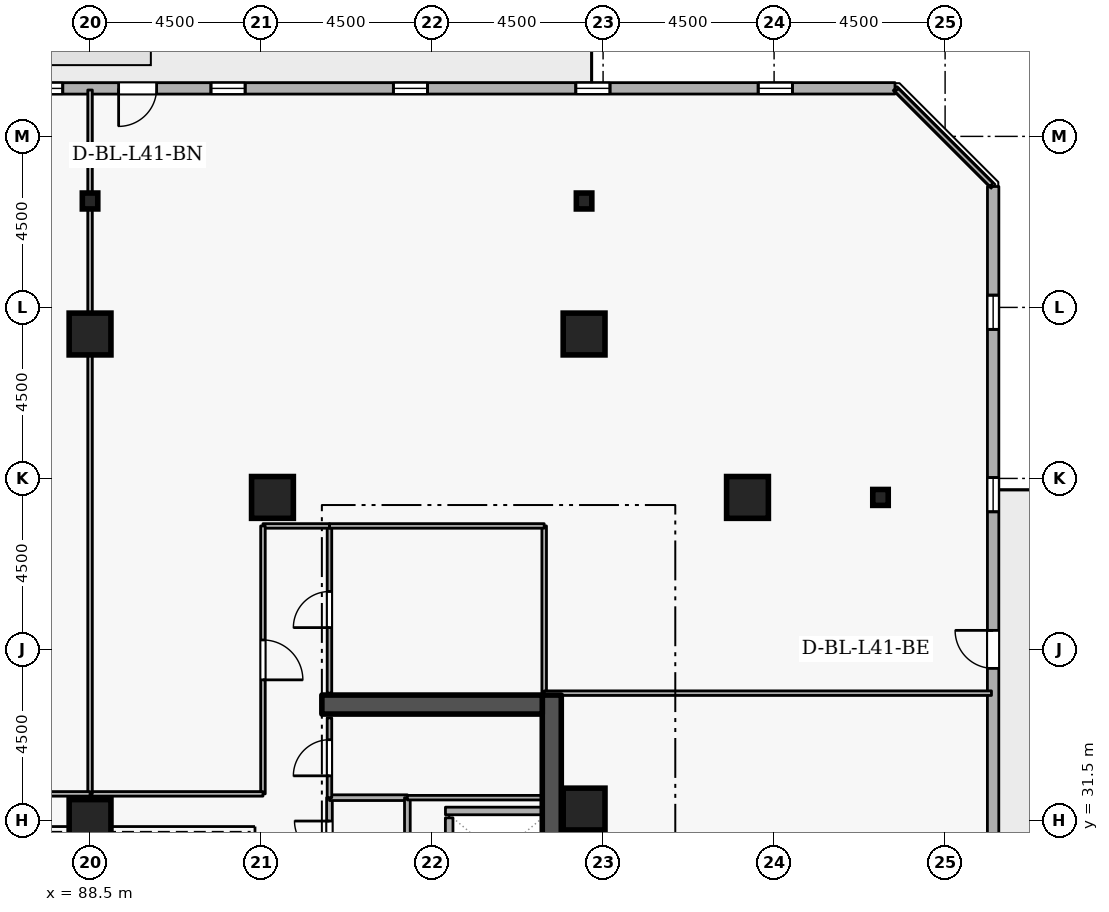
"""IFC4 building model, lengths in metres.
Left out: names, types, materials, properties, quantities, classifications, styles, units other than length and angle.
Written with IfcOpenShell. Run it as: python <this file> out.ifc"""

import sys

from ifc_helpers import new_model, si_unit, direction, frame, frame_2d, origin, origin_2d, place, context, subcontext, project, spatial, rectangle, i_section, extrude, element, fill, save


model = new_model("IFC4")
c1 = context("Model", 3, precision=1e-05, world=origin(), true_north=direction((0.0, 1.0)))
c2 = subcontext(c1, "Body", "Model", "MODEL_VIEW")
j1 = project(units=[si_unit("LENGTHUNIT", "METRE"), si_unit("PLANEANGLEUNIT", "RADIAN")], contexts=[c1])
p1 = place(None, origin())
s1 = spatial("IfcSite", under=j1, at=p1, CompositionType="ELEMENT")
p2 = place(p1, origin())
s2 = spatial("IfcBuilding", under=s1, at=p2, CompositionType="ELEMENT")
p3 = place(p2, frame((0.0, 0.0, 156.3)))
s3 = spatial("IfcBuildingStorey", under=s2, at=p3, CompositionType="ELEMENT", Elevation=156.3)
p4 = place(p3, frame((100.65, 19.2, 0.0), z_axis=(0.0, 0.0, 1.0), x_axis=(0.0, 1.0, 0.0)))
e1 = element("IfcWall", 1, at=p4, inside=s3, PredefinedType="SHEAR", context=c2, shape_type="SweptSolid", body=[
    extrude(rectangle(XDim=15.6, YDim=0.5, at=frame_2d((7.8, 0.0))), origin(), (0.0, 0.0, 1.0), 3.6),
])
p5 = place(p3, frame((94.6, 34.55, 0.0), z_axis=(0.0, 0.0, 1.0), x_axis=(1.0, 0.0, 0.0)))
e2 = element("IfcWall", 2, at=p5, inside=s3, PredefinedType="SHEAR", context=c2, shape_type="SweptSolid", body=[
    extrude(rectangle(XDim=5.8, YDim=0.5, at=frame_2d((2.9, 0.0))), origin(), (0.0, 0.0, 1.0), 3.6),
])
for number, where, z_axis, x_axis in (
    (3, (105.8, 40.0, 0.0), (0.0, 0.0, 1.0), (1.0, 0.0, 0.0)),
    (4, (101.5, 44.3, 0.0), (0.0, 0.0, 1.0), (1.0, 0.0, 0.0)),
    (5, (88.5, 44.3, 0.0), (0.0, 0.0, 1.0), (1.0, 0.0, 0.0)),
    (6, (93.3, 40.0, 0.0), (0.0, 0.0, 1.0), (1.0, 0.0, 0.0)),
    (7, (101.5, 31.8, 0.0), (0.0, 0.0, 1.0), (1.0, 0.0, 0.0)),
    (8, (88.5, 31.5, 0.0), (0.0, 0.0, 1.0), (1.0, 0.0, 0.0)),
):
    element("IfcColumn", number, at=place(p3, frame(where, z_axis=z_axis, x_axis=x_axis)), inside=s3, PredefinedType="COLUMN", context=c2, shape_type="SweptSolid", body=[
        extrude(rectangle(XDim=1.1, YDim=1.1, at=origin_2d()), origin(), (0.0, 0.0, 1.0), 3.6),
    ])
for number, where, z_axis, x_axis in (
    (9, (109.3, 40.0, 0.0), (0.0, 0.0, 1.0), (1.0, 0.0, 0.0)),
    (10, (101.5, 47.8, 0.0), (0.0, 0.0, 1.0), (1.0, 0.0, 0.0)),
    (11, (88.5, 47.8, 0.0), (0.0, 0.0, 1.0), (1.0, 0.0, 0.0)),
):
    element("IfcColumn", number, at=place(p3, frame(where, z_axis=z_axis, x_axis=x_axis)), inside=s3, PredefinedType="COLUMN", context=c2, shape_type="SweptSolid", body=[
        extrude(i_section(OverallWidth=0.407, OverallDepth=0.419, WebThickness=0.031, FlangeThickness=0.049, FilletRadius=0.015, at=origin_2d()), origin(), (0.0, 0.0, 1.0), 3.6),
    ])
p6 = place(p3, frame((112.261, 12.922, 0.0), z_axis=(0.0, 0.0, 1.0), x_axis=(0.000103863011, 0.999999994606, 0.0)))
e12 = element("IfcWall", 12, at=p6, inside=s3, PredefinedType="STANDARD", context=c2, shape_type="SweptSolid", body=[
    extrude(rectangle(XDim=35.259, YDim=0.3, at=frame_2d((17.629, 0.0))), origin(), (0.0, 0.0, 1.0), 2.7),
])
p7 = place(p6, frame((22.58, 0.0, 0.0)))
e13 = element("IfcOpeningElement", 13, at=p7, cuts=e12, PredefinedType="OPENING", context=c2, shape_type="SweptSolid", body=[
    extrude(rectangle(XDim=1.0, YDim=2.08, at=frame_2d((0.5, 1.04))), frame((0.0, 0.16, 0.0), z_axis=(0.0, -1.0, 0.0), x_axis=(1.0, 0.0, 0.0)), (0.0, 0.0, 1.0), 0.32),
])
p8 = place(p6, frame((7.5, 0.0, 0.72)))
e14 = element("IfcOpeningElement", 14, at=p8, cuts=e12, PredefinedType="OPENING", context=c2, shape_type="SweptSolid", body=[
    extrude(rectangle(XDim=0.9, YDim=1.75, at=frame_2d((0.45, 0.875))), frame((0.0, 0.16, 0.0), z_axis=(0.0, -1.0, 0.0), x_axis=(1.0, 0.0, 0.0)), (0.0, 0.0, 1.0), 0.32),
])
p9 = place(p6, frame((12.3, 0.0, 0.72)))
e15 = element("IfcOpeningElement", 15, at=p9, cuts=e12, PredefinedType="OPENING", context=c2, shape_type="SweptSolid", body=[
    extrude(rectangle(XDim=0.9, YDim=1.75, at=frame_2d((0.45, 0.875))), frame((0.0, 0.16, 0.0), z_axis=(0.0, -1.0, 0.0), x_axis=(1.0, 0.0, 0.0)), (0.0, 0.0, 1.0), 0.32),
])
p10 = place(p6, frame((17.1, 0.0, 0.72)))
e16 = element("IfcOpeningElement", 16, at=p10, cuts=e12, PredefinedType="OPENING", context=c2, shape_type="SweptSolid", body=[
    extrude(rectangle(XDim=0.9, YDim=1.75, at=frame_2d((0.45, 0.875))), frame((0.0, 0.16, 0.0), z_axis=(0.0, -1.0, 0.0), x_axis=(1.0, 0.0, 0.0)), (0.0, 0.0, 1.0), 0.32),
])
p11 = place(p6, frame((26.7, 0.0, 0.72)))
e17 = element("IfcOpeningElement", 17, at=p11, cuts=e12, PredefinedType="OPENING", context=c2, shape_type="SweptSolid", body=[
    extrude(rectangle(XDim=0.9, YDim=1.75, at=frame_2d((0.45, 0.875))), frame((0.0, 0.16, 0.0), z_axis=(0.0, -1.0, 0.0), x_axis=(1.0, 0.0, 0.0)), (0.0, 0.0, 1.0), 0.32),
])
p12 = place(p6, frame((31.5, 0.0, 0.72)))
e18 = element("IfcOpeningElement", 18, at=p12, cuts=e12, PredefinedType="OPENING", context=c2, shape_type="SweptSolid", body=[
    extrude(rectangle(XDim=0.9, YDim=1.75, at=frame_2d((0.45, 0.875))), frame((0.0, 0.16, 0.0), z_axis=(0.0, -1.0, 0.0), x_axis=(1.0, 0.0, 0.0)), (0.0, 0.0, 1.0), 0.32),
])
p13 = place(p3, frame((109.681, 50.765, 0.0), z_axis=(0.0, 0.0, 1.0), x_axis=(-0.999999994606, -0.000103863011, 0.0)))
e19 = element("IfcWall", 19, at=p13, inside=s3, PredefinedType="STANDARD", context=c2, shape_type="SweptSolid", body=[
    extrude(rectangle(XDim=35.259, YDim=0.3, at=frame_2d((17.629, 0.0))), origin(), (0.0, 0.0, 1.0), 2.7),
])
p14 = place(p13, frame((19.43, 0.0, 0.0)))
e20 = element("IfcOpeningElement", 20, at=p14, cuts=e19, PredefinedType="OPENING", context=c2, shape_type="SweptSolid", body=[
    extrude(rectangle(XDim=1.0, YDim=2.08, at=frame_2d((0.5, 1.04))), frame((0.0, 0.16, 0.0), z_axis=(0.0, -1.0, 0.0), x_axis=(1.0, 0.0, 0.0)), (0.0, 0.0, 1.0), 0.32),
])
p15 = place(p13, frame((2.7, 0.0, 0.72)))
e21 = element("IfcOpeningElement", 21, at=p15, cuts=e19, PredefinedType="OPENING", context=c2, shape_type="SweptSolid", body=[
    extrude(rectangle(XDim=0.9, YDim=1.75, at=frame_2d((0.45, 0.875))), frame((0.0, 0.16, 0.0), z_axis=(0.0, -1.0, 0.0), x_axis=(1.0, 0.0, 0.0)), (0.0, 0.0, 1.0), 0.32),
])
p16 = place(p13, frame((7.5, 0.0, 0.72)))
e22 = element("IfcOpeningElement", 22, at=p16, cuts=e19, PredefinedType="OPENING", context=c2, shape_type="SweptSolid", body=[
    extrude(rectangle(XDim=0.9, YDim=1.75, at=frame_2d((0.45, 0.875))), frame((0.0, 0.16, 0.0), z_axis=(0.0, -1.0, 0.0), x_axis=(1.0, 0.0, 0.0)), (0.0, 0.0, 1.0), 0.32),
])
p17 = place(p13, frame((12.3, 0.0, 0.72)))
e23 = element("IfcOpeningElement", 23, at=p17, cuts=e19, PredefinedType="OPENING", context=c2, shape_type="SweptSolid", body=[
    extrude(rectangle(XDim=0.9, YDim=1.75, at=frame_2d((0.45, 0.875))), frame((0.0, 0.16, 0.0), z_axis=(0.0, -1.0, 0.0), x_axis=(1.0, 0.0, 0.0)), (0.0, 0.0, 1.0), 0.32),
])
p18 = place(p13, frame((17.1, 0.0, 0.72)))
e24 = element("IfcOpeningElement", 24, at=p18, cuts=e19, PredefinedType="OPENING", context=c2, shape_type="SweptSolid", body=[
    extrude(rectangle(XDim=0.9, YDim=1.75, at=frame_2d((0.45, 0.875))), frame((0.0, 0.16, 0.0), z_axis=(0.0, -1.0, 0.0), x_axis=(1.0, 0.0, 0.0)), (0.0, 0.0, 1.0), 0.32),
])
p19 = place(p13, frame((21.9, 0.0, 0.72)))
e25 = element("IfcOpeningElement", 25, at=p19, cuts=e19, PredefinedType="OPENING", context=c2, shape_type="SweptSolid", body=[
    extrude(rectangle(XDim=0.9, YDim=1.75, at=frame_2d((0.45, 0.875))), frame((0.0, 0.16, 0.0), z_axis=(0.0, -1.0, 0.0), x_axis=(1.0, 0.0, 0.0)), (0.0, 0.0, 1.0), 0.32),
])
p20 = place(p13, frame((26.7, 0.0, 0.72)))
e26 = element("IfcOpeningElement", 26, at=p20, cuts=e19, PredefinedType="OPENING", context=c2, shape_type="SweptSolid", body=[
    extrude(rectangle(XDim=0.9, YDim=1.75, at=frame_2d((0.45, 0.875))), frame((0.0, 0.16, 0.0), z_axis=(0.0, -1.0, 0.0), x_axis=(1.0, 0.0, 0.0)), (0.0, 0.0, 1.0), 0.32),
])
p21 = place(p13, frame((31.5, 0.0, 0.72)))
e27 = element("IfcOpeningElement", 27, at=p21, cuts=e19, PredefinedType="OPENING", context=c2, shape_type="SweptSolid", body=[
    extrude(rectangle(XDim=0.9, YDim=1.75, at=frame_2d((0.45, 0.875))), frame((0.0, 0.16, 0.0), z_axis=(0.0, -1.0, 0.0), x_axis=(1.0, 0.0, 0.0)), (0.0, 0.0, 1.0), 0.32),
])
p22 = place(p3, frame((97.95, 31.57, 0.0), z_axis=(0.0, 0.0, 1.0), x_axis=(0.0, -1.0, 0.0)))
e28 = element("IfcWall", 28, at=p22, inside=s3, PredefinedType="STANDARD", context=c2, shape_type="SweptSolid", body=[
    extrude(rectangle(XDim=1.99, YDim=0.2, at=frame_2d((0.995, 0.0))), origin(), (0.0, 0.0, 1.0), 3.34),
])
p23 = place(p3, frame((97.852, 31.75, 0.0), z_axis=(0.0, 0.0, 1.0), x_axis=(1.0, 0.0, 0.0)))
e29 = element("IfcWall", 29, at=p23, inside=s3, PredefinedType="STANDARD", context=c2, shape_type="SweptSolid", body=[
    extrude(rectangle(XDim=2.536, YDim=0.2, at=frame_2d((1.268, 0.0))), origin(), (0.0, 0.0, 1.0), 3.34),
])
p24 = place(p3, frame((94.8, 29.95, 0.0), z_axis=(0.0, 0.0, 1.0), x_axis=(0.0, 1.0, 0.0)))
e30 = element("IfcWall", 30, at=p24, inside=s3, PredefinedType="PARTITIONING", context=c2, shape_type="SweptSolid", body=[
    extrude(rectangle(XDim=2.15, YDim=0.15, at=frame_2d((1.075, 0.0))), origin(), (0.0, 0.0, 1.0), 3.34),
])
p25 = place(p24, frame((0.615, 0.0, 0.0)))
e31 = element("IfcOpeningElement", 31, at=p25, cuts=e30, PredefinedType="OPENING", context=c2, shape_type="SweptSolid", body=[
    extrude(rectangle(XDim=0.92, YDim=2.08, at=frame_2d((0.46, 1.04))), frame((0.0, 0.085, 0.0), z_axis=(0.0, -1.0, 0.0), x_axis=(1.0, 0.0, 0.0)), (0.0, 0.0, 1.0), 0.17),
])
p26 = place(p3, frame((94.8, 32.1, 0.0), z_axis=(0.0, 0.0, 1.0), x_axis=(1.0, 0.0, 0.0)))
e32 = element("IfcWall", 32, at=p26, inside=s3, PredefinedType="PARTITIONING", context=c2, shape_type="SweptSolid", body=[
    extrude(rectangle(XDim=2.05, YDim=0.15, at=frame_2d((1.025, 0.0))), origin(), (0.0, 0.0, 1.0), 3.34),
])
p27 = place(p3, frame((96.85, 32.1, 0.0), z_axis=(0.0, 0.0, 1.0), x_axis=(0.0, -1.0, 0.0)))
e33 = element("IfcWall", 33, at=p27, inside=s3, PredefinedType="PARTITIONING", context=c2, shape_type="SweptSolid", body=[
    extrude(rectangle(XDim=2.15, YDim=0.15, at=frame_2d((1.075, 0.0))), origin(), (0.0, 0.0, 1.0), 3.34),
])
p28 = place(p3, frame((94.8, 32.1, 0.0), z_axis=(0.0, 0.0, 1.0), x_axis=(0.0, 1.0, 0.0)))
e34 = element("IfcWall", 34, at=p28, inside=s3, PredefinedType="PARTITIONING", context=c2, shape_type="SweptSolid", body=[
    extrude(rectangle(XDim=2.1, YDim=0.12, at=frame_2d((1.05, 0.0))), origin(), (0.0, 0.0, 1.0), 3.34),
])
p29 = place(p28, frame((0.575, 0.0, 0.0)))
e35 = element("IfcOpeningElement", 35, at=p29, cuts=e34, PredefinedType="OPENING", context=c2, shape_type="SweptSolid", body=[
    extrude(rectangle(XDim=0.95, YDim=2.1, at=frame_2d((0.475, 1.05))), frame((0.0, 0.07, 0.0), z_axis=(0.0, -1.0, 0.0), x_axis=(1.0, 0.0, 0.0)), (0.0, 0.0, 1.0), 0.14),
])
p30 = place(p3, frame((100.4, 32.1, 0.0), z_axis=(0.0, 0.0, 1.0), x_axis=(-1.0, 0.0, 0.0)))
e36 = element("IfcWall", 36, at=p30, inside=s3, PredefinedType="PARTITIONING", context=c2, shape_type="SweptSolid", body=[
    extrude(rectangle(XDim=3.55, YDim=0.12, at=frame_2d((1.775, 0.0))), origin(), (0.0, 0.0, 1.0), 3.34),
])
p31 = place(p3, frame((100.45, 39.25, 0.0), z_axis=(0.0, 0.0, 1.0), x_axis=(0.0, -1.0, 0.0)))
e37 = element("IfcWall", 37, at=p31, inside=s3, PredefinedType="PARTITIONING", context=c2, shape_type="SweptSolid", body=[
    extrude(rectangle(XDim=4.4, YDim=0.12, at=frame_2d((2.2, 0.0))), origin(), (0.0, 0.0, 1.0), 3.34),
])
p32 = place(p3, frame((94.8, 34.85, 0.0), z_axis=(0.0, 0.0, 1.0), x_axis=(0.0, 1.0, 0.0)))
e38 = element("IfcWall", 38, at=p32, inside=s3, PredefinedType="PARTITIONING", context=c2, shape_type="SweptSolid", body=[
    extrude(rectangle(XDim=4.4, YDim=0.12, at=frame_2d((2.2, 0.0))), origin(), (0.0, 0.0, 1.0), 3.34),
])
p33 = place(p32, frame((1.725, 0.0, 0.0)))
e39 = element("IfcOpeningElement", 39, at=p33, cuts=e38, PredefinedType="OPENING", context=c2, shape_type="SweptSolid", body=[
    extrude(rectangle(XDim=0.95, YDim=2.1, at=frame_2d((0.475, 1.05))), frame((0.0, 0.07, 0.0), z_axis=(0.0, -1.0, 0.0), x_axis=(1.0, 0.0, 0.0)), (0.0, 0.0, 1.0), 0.14),
])
p34 = place(p3, frame((94.8, 39.25, 0.0), z_axis=(0.0, 0.0, 1.0), x_axis=(1.0, 0.0, 0.0)))
e40 = element("IfcWall", 40, at=p34, inside=s3, PredefinedType="PARTITIONING", context=c2, shape_type="SweptSolid", body=[
    extrude(rectangle(XDim=5.65, YDim=0.12, at=frame_2d((2.825, 0.0))), origin(), (0.0, 0.0, 1.0), 3.34),
])
p35 = place(p3, frame((94.8, 39.25, 0.0), z_axis=(0.0, 0.0, 1.0), x_axis=(-1.0, 0.0, 0.0)))
e41 = element("IfcWall", 41, at=p35, inside=s3, PredefinedType="PARTITIONING", context=c2, shape_type="SweptSolid", body=[
    extrude(rectangle(XDim=1.75, YDim=0.12, at=frame_2d((0.875, 0.0))), origin(), (0.0, 0.0, 1.0), 3.34),
])
p36 = place(p3, frame((93.05, 39.25, 0.0), z_axis=(0.0, 0.0, 1.0), x_axis=(0.0, -1.0, 0.0)))
e42 = element("IfcWall", 42, at=p36, inside=s3, PredefinedType="PARTITIONING", context=c2, shape_type="SweptSolid", body=[
    extrude(rectangle(XDim=7.05, YDim=0.12, at=frame_2d((3.525, 0.0))), origin(), (0.0, 0.0, 1.0), 3.34),
])
p37 = place(p36, frame((3.0, 0.0, 0.0)))
e43 = element("IfcOpeningElement", 43, at=p37, cuts=e42, PredefinedType="OPENING", context=c2, shape_type="SweptSolid", body=[
    extrude(rectangle(XDim=1.05, YDim=2.1, at=frame_2d((0.525, 1.05))), frame((0.0, 0.07, 0.0), z_axis=(0.0, -1.0, 0.0), x_axis=(1.0, 0.0, 0.0)), (0.0, 0.0, 1.0), 0.14),
])
p38 = place(p3, frame((93.05, 32.2, 0.0), z_axis=(0.0, 0.0, 1.0), x_axis=(-1.0, 0.0, 0.0)))
e44 = element("IfcWall", 44, at=p38, inside=s3, PredefinedType="PARTITIONING", context=c2, shape_type="SweptSolid", body=[
    extrude(rectangle(XDim=4.55, YDim=0.12, at=frame_2d((2.275, 0.0))), origin(), (0.0, 0.0, 1.0), 3.34),
])
p39 = place(p3, frame((88.5, 32.2, 0.0), z_axis=(0.0, 0.0, 1.0), x_axis=(0.0, 1.0, 0.0)))
e45 = element("IfcWall", 45, at=p39, inside=s3, PredefinedType="PARTITIONING", context=c2, shape_type="SweptSolid", body=[
    extrude(rectangle(XDim=18.52, YDim=0.12, at=frame_2d((9.26, 0.0))), origin(), (0.0, 0.0, 1.0), 2.932),
])
p40 = place(p3, frame((109.725, 50.72, 0.0), z_axis=(0.0, 0.0, 1.0), x_axis=(0.707106781187, -0.707106781187, 0.0)))
e46 = element("IfcWall", 46, at=p40, inside=s3, PredefinedType="PARTITIONING", context=c2, shape_type="SweptSolid", body=[
    extrude(rectangle(XDim=3.528, YDim=0.12, at=frame_2d((1.764, 0.0))), origin(), (0.0, 0.0, 1.0), 3.34),
])
p41 = place(p3, frame((112.22, 34.85, 0.0), z_axis=(0.0, 0.0, 1.0), x_axis=(-1.0, 0.0, 0.0)))
e47 = element("IfcWall", 47, at=p41, inside=s3, PredefinedType="PARTITIONING", context=c2, shape_type="SweptSolid", body=[
    extrude(rectangle(XDim=11.77, YDim=0.12, at=frame_2d((5.885, 0.0))), origin(), (0.0, 0.0, 1.0), 2.545),
])
p42 = place(p3, frame((88.5, 32.2, 0.0), z_axis=(0.0, 0.0, 1.0), x_axis=(-1.0, 0.0, 0.0)))
e48 = element("IfcWall", 48, at=p42, inside=s3, PredefinedType="PARTITIONING", context=c2, shape_type="SweptSolid", body=[
    extrude(rectangle(XDim=4.55, YDim=0.12, at=frame_2d((2.275, 0.0))), origin(), (0.0, 0.0, 1.0), 3.34),
])
p43 = place(p7, origin())
e49 = element("IfcDoor", 49, at=p43, inside=s3, OperationType="SINGLE_SWING_RIGHT", PredefinedType="DOOR", context=c2, shape_type="SweptSolid", body=[
    extrude(rectangle(XDim=1.0, YDim=2.08, at=frame_2d((0.5, 1.04))), frame((0.0, 0.025, 0.0), z_axis=(0.0, -1.0, 0.0), x_axis=(1.0, 0.0, 0.0)), (0.0, 0.0, 1.0), 0.05),
])
fill(e13, e49)
p44 = place(p11, origin())
e50 = element("IfcWindow", 50, at=p44, inside=s3, PartitioningType="SINGLE_PANEL", PredefinedType="WINDOW", context=c2, shape_type="SweptSolid", body=[
    extrude(rectangle(XDim=0.9, YDim=1.75, at=frame_2d((0.45, 0.875))), frame((0.0, 0.03, 0.0), z_axis=(0.0, -1.0, 0.0), x_axis=(1.0, 0.0, 0.0)), (0.0, 0.0, 1.0), 0.06),
])
fill(e17, e50)
p45 = place(p12, origin())
e51 = element("IfcWindow", 51, at=p45, inside=s3, PartitioningType="SINGLE_PANEL", PredefinedType="WINDOW", context=c2, shape_type="SweptSolid", body=[
    extrude(rectangle(XDim=0.9, YDim=1.75, at=frame_2d((0.45, 0.875))), frame((0.0, 0.03, 0.0), z_axis=(0.0, -1.0, 0.0), x_axis=(1.0, 0.0, 0.0)), (0.0, 0.0, 1.0), 0.06),
])
fill(e18, e51)
p46 = place(p14, origin())
e52 = element("IfcDoor", 52, at=p46, inside=s3, OperationType="SINGLE_SWING_RIGHT", PredefinedType="DOOR", context=c2, shape_type="SweptSolid", body=[
    extrude(rectangle(XDim=1.0, YDim=2.08, at=frame_2d((0.5, 1.04))), frame((0.0, 0.025, 0.0), z_axis=(0.0, -1.0, 0.0), x_axis=(1.0, 0.0, 0.0)), (0.0, 0.0, 1.0), 0.05),
])
fill(e20, e52)
p47 = place(p15, origin())
e53 = element("IfcWindow", 53, at=p47, inside=s3, PartitioningType="SINGLE_PANEL", PredefinedType="WINDOW", context=c2, shape_type="SweptSolid", body=[
    extrude(rectangle(XDim=0.9, YDim=1.75, at=frame_2d((0.45, 0.875))), frame((0.0, 0.03, 0.0), z_axis=(0.0, -1.0, 0.0), x_axis=(1.0, 0.0, 0.0)), (0.0, 0.0, 1.0), 0.06),
])
fill(e21, e53)
p48 = place(p16, origin())
e54 = element("IfcWindow", 54, at=p48, inside=s3, PartitioningType="SINGLE_PANEL", PredefinedType="WINDOW", context=c2, shape_type="SweptSolid", body=[
    extrude(rectangle(XDim=0.9, YDim=1.75, at=frame_2d((0.45, 0.875))), frame((0.0, 0.03, 0.0), z_axis=(0.0, -1.0, 0.0), x_axis=(1.0, 0.0, 0.0)), (0.0, 0.0, 1.0), 0.06),
])
fill(e22, e54)
p49 = place(p17, origin())
e55 = element("IfcWindow", 55, at=p49, inside=s3, PartitioningType="SINGLE_PANEL", PredefinedType="WINDOW", context=c2, shape_type="SweptSolid", body=[
    extrude(rectangle(XDim=0.9, YDim=1.75, at=frame_2d((0.45, 0.875))), frame((0.0, 0.03, 0.0), z_axis=(0.0, -1.0, 0.0), x_axis=(1.0, 0.0, 0.0)), (0.0, 0.0, 1.0), 0.06),
])
fill(e23, e55)
p50 = place(p18, origin())
e56 = element("IfcWindow", 56, at=p50, inside=s3, PartitioningType="SINGLE_PANEL", PredefinedType="WINDOW", context=c2, shape_type="SweptSolid", body=[
    extrude(rectangle(XDim=0.9, YDim=1.75, at=frame_2d((0.45, 0.875))), frame((0.0, 0.03, 0.0), z_axis=(0.0, -1.0, 0.0), x_axis=(1.0, 0.0, 0.0)), (0.0, 0.0, 1.0), 0.06),
])
fill(e24, e56)
p51 = place(p19, origin())
e57 = element("IfcWindow", 57, at=p51, inside=s3, PartitioningType="SINGLE_PANEL", PredefinedType="WINDOW", context=c2, shape_type="SweptSolid", body=[
    extrude(rectangle(XDim=0.9, YDim=1.75, at=frame_2d((0.45, 0.875))), frame((0.0, 0.03, 0.0), z_axis=(0.0, -1.0, 0.0), x_axis=(1.0, 0.0, 0.0)), (0.0, 0.0, 1.0), 0.06),
])
fill(e25, e57)
p52 = place(p25, origin())
e58 = element("IfcDoor", 58, at=p52, inside=s3, OperationType="SINGLE_SWING_RIGHT", PredefinedType="DOOR", context=c2, shape_type="SweptSolid", body=[
    extrude(rectangle(XDim=0.92, YDim=2.08, at=frame_2d((0.46, 1.04))), frame((0.0, 0.025, 0.0), z_axis=(0.0, -1.0, 0.0), x_axis=(1.0, 0.0, 0.0)), (0.0, 0.0, 1.0), 0.05),
])
fill(e31, e58)
p53 = place(p29, origin())
e59 = element("IfcDoor", 59, at=p53, inside=s3, OperationType="SINGLE_SWING_LEFT", PredefinedType="DOOR", context=c2, shape_type="SweptSolid", body=[
    extrude(rectangle(XDim=0.95, YDim=2.1, at=frame_2d((0.475, 1.05))), frame((0.0, 0.025, 0.0), z_axis=(0.0, -1.0, 0.0), x_axis=(1.0, 0.0, 0.0)), (0.0, 0.0, 1.0), 0.05),
])
fill(e35, e59)
p54 = place(p33, origin())
e60 = element("IfcDoor", 60, at=p54, inside=s3, OperationType="SINGLE_SWING_LEFT", PredefinedType="DOOR", context=c2, shape_type="SweptSolid", body=[
    extrude(rectangle(XDim=0.95, YDim=2.1, at=frame_2d((0.475, 1.05))), frame((0.0, 0.025, 0.0), z_axis=(0.0, -1.0, 0.0), x_axis=(1.0, 0.0, 0.0)), (0.0, 0.0, 1.0), 0.05),
])
fill(e39, e60)
p55 = place(p37, origin())
e61 = element("IfcDoor", 61, at=p55, inside=s3, OperationType="SINGLE_SWING_RIGHT", PredefinedType="DOOR", context=c2, shape_type="SweptSolid", body=[
    extrude(rectangle(XDim=1.05, YDim=2.1, at=frame_2d((0.525, 1.05))), frame((0.0, 0.025, 0.0), z_axis=(0.0, -1.0, 0.0), x_axis=(1.0, 0.0, 0.0)), (0.0, 0.0, 1.0), 0.05),
])
fill(e43, e61)
save(model, sys.argv[1])
